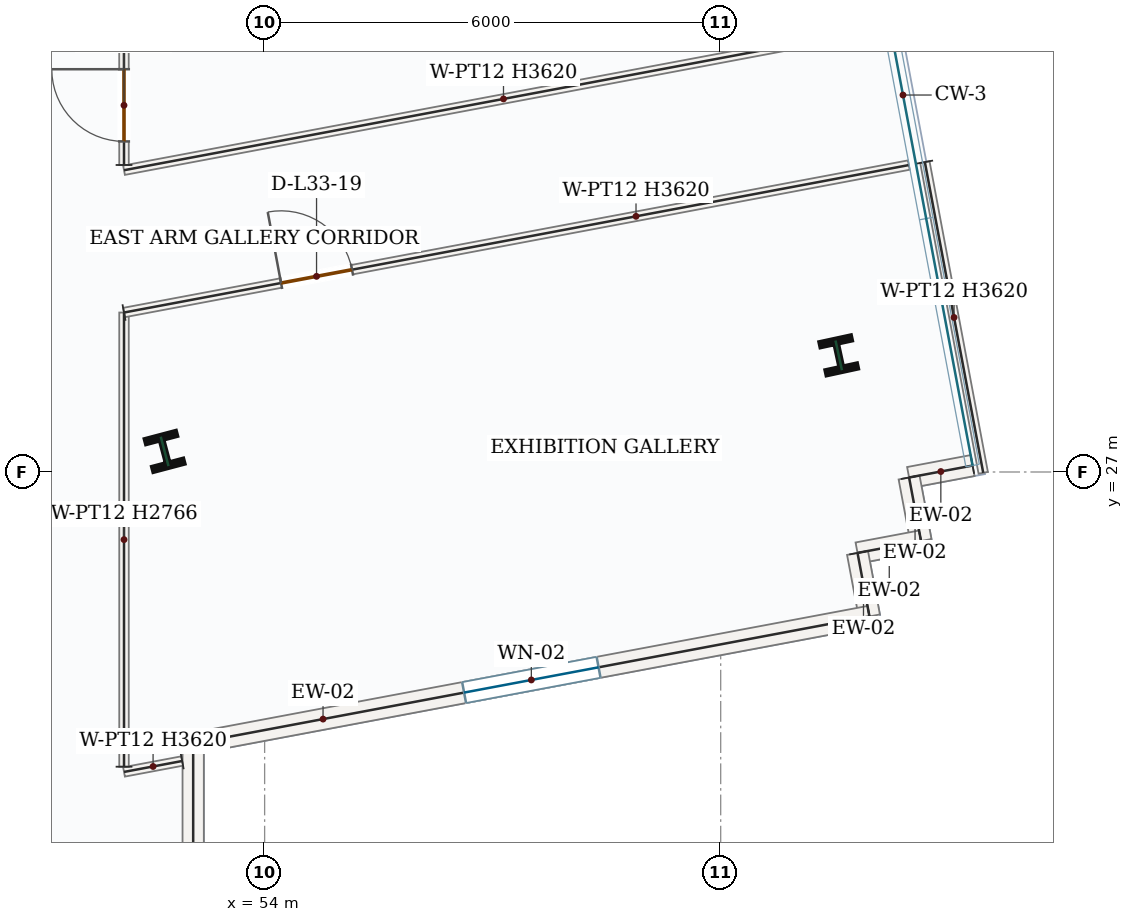
"""IFC4 building model, lengths in metres.
Left out: names, types, materials, properties, quantities, classifications, styles, units other than length and angle.
Written with IfcOpenShell. Run it as: python <this file> out.ifc"""

import sys

from ifc_helpers import new_model, si_unit, direction, frame, frame_2d, origin, origin_2d, place, context, subcontext, project, spatial, rectangle, i_section, extrude, source, transform, mapped, element, fill, save


model = new_model("IFC4")
c1 = context("Model", 3, precision=1e-05, world=origin(), true_north=direction((0.0, 1.0)))
c2 = subcontext(c1, "Body", "Model", "MODEL_VIEW")
j1 = project(units=[si_unit("LENGTHUNIT", "METRE"), si_unit("PLANEANGLEUNIT", "RADIAN")], contexts=[c1])
p1 = place(None, origin())
s1 = spatial("IfcSite", under=j1, at=p1, CompositionType="ELEMENT")
p2 = place(p1, origin())
s2 = spatial("IfcBuilding", under=s1, at=p2, CompositionType="ELEMENT")
p3 = place(p2, frame((0.0, 0.0, 147.3)))
s3 = spatial("IfcBuildingStorey", under=s2, at=p3, CompositionType="ELEMENT", Elevation=147.3)
m1 = source(origin(), c2, "Body", "SweptSolid", [
    extrude(i_section(OverallWidth=0.412, OverallDepth=0.435, WebThickness=0.036, FlangeThickness=0.057, FilletRadius=0.018, at=origin_2d()), origin(), (0.0, 0.0, 1.0), 3.9),
])
for number, where, z_axis, x_axis in (
    (1, (52.684, 27.271, 0.0), (0.0, 0.0, 1.0), (0.967, 0.255, 0.0)),
    (2, (61.553, 28.535, 0.0), (0.0, 0.0, 1.0), (0.977, 0.211, 0.0)),
):
    element("IfcColumn", number, at=place(p3, frame(where, z_axis=z_axis, x_axis=x_axis)), inside=s3, PredefinedType="COLUMN", context=c2, shape_type="MappedRepresentation", body=[
        mapped(m1, transform((0.0, 0.0, 0.0), x_axis=(1.0, 0.0, 0.0), y_axis=(0.0, 1.0, 0.0), z_axis=(0.0, 0.0, 1.0), scale=1.0)),
    ])
m2 = source(origin(), c2, "Body", "SweptSolid", [
    extrude(rectangle(XDim=0.85, YDim=0.28, at=frame_2d((0.425, 0.0))), origin(), (0.0, 0.0, 1.0), 3.62),
])
for number, where, z_axis, x_axis in (
    (3, (63.314, 27.085, 0.0), (0.0, 0.0, 1.0), (-0.983, -0.185, 0.0)),
    (4, (62.479, 26.928, 0.0), (0.0, 0.0, 1.0), (0.185, -0.983, 0.0)),
):
    element("IfcWall", number, at=place(p3, frame(where, z_axis=z_axis, x_axis=x_axis)), inside=s3, PredefinedType="SOLIDWALL", context=c2, shape_type="MappedRepresentation", body=[
        mapped(m2, transform((0.0, 0.0, 0.0), x_axis=(1.0, 0.0, 0.0), y_axis=(0.0, 1.0, 0.0), z_axis=(0.0, 0.0, 1.0), scale=1.0)),
    ])
m3 = source(origin(), c2, "Body", "SweptSolid", [
    extrude(rectangle(XDim=0.85, YDim=0.28, at=frame_2d((0.425, 0.0))), origin(), (0.0, 0.0, 1.0), 3.62),
])
p4 = place(p3, frame((62.635, 26.092, 0.0), z_axis=(0.0, 0.0, 1.0), x_axis=(-0.982790785128, -0.184722149909, 0.0)))
e5 = element("IfcWall", 5, at=p4, inside=s3, PredefinedType="SOLIDWALL", context=c2, shape_type="MappedRepresentation", body=[
    mapped(m3, transform((0.0, 0.0, 0.0), x_axis=(1.0, 0.0, 0.0), y_axis=(0.0, 1.0, 0.0), z_axis=(0.0, 0.0, 1.0), scale=1.0)),
])
p5 = place(p3, frame((61.8, 25.935, 0.0), z_axis=(0.0, 0.0, 1.0), x_axis=(0.184392582027, -0.982852672425, 0.0)))
e6 = element("IfcWall", 6, at=p5, inside=s3, PredefinedType="SOLIDWALL", context=c2, shape_type="MappedRepresentation", body=[
    mapped(m2, transform((0.0, 0.0, 0.0), x_axis=(1.0, 0.0, 0.0), y_axis=(0.0, 1.0, 0.0), z_axis=(0.0, 0.0, 1.0), scale=1.0)),
])
p6 = place(p3, frame((61.957, 25.1, 0.0), z_axis=(0.0, 0.0, 1.0), x_axis=(-0.982808012228, -0.184630471755, 0.0)))
e7 = element("IfcWall", 7, at=p6, inside=s3, PredefinedType="SOLIDWALL", context=c2, shape_type="SweptSolid", body=[
    extrude(rectangle(XDim=9.052, YDim=0.28, at=frame_2d((4.526, 0.0))), origin(), (0.0, 0.0, 1.0), 3.62),
])
p7 = place(p6, frame((3.626, 0.0, 0.85)))
e8 = element("IfcOpeningElement", 8, at=p7, cuts=e7, PredefinedType="OPENING", context=c2, shape_type="SweptSolid", body=[
    extrude(rectangle(XDim=1.8, YDim=1.75, at=frame_2d((0.9, 0.875))), frame((0.0, 0.15, 0.0), z_axis=(0.0, -1.0, 0.0), x_axis=(1.0, 0.0, 0.0)), (0.0, 0.0, 1.0), 0.3),
])
m4 = source(origin(), c2, "Body", "SweptSolid", [
    extrude(rectangle(XDim=4.97, YDim=0.28, at=frame_2d((2.485, 0.0))), origin(), (0.0, 0.0, 1.0), 3.62),
])
p8 = place(p3, frame((53.06, 23.428, 0.0), z_axis=(0.0, 0.0, 1.0), x_axis=(0.0, -1.0, 0.0)))
e9 = element("IfcWall", 9, at=p8, inside=s3, PredefinedType="SOLIDWALL", context=c2, shape_type="MappedRepresentation", body=[
    mapped(m4, transform((0.0, 0.0, 0.0), x_axis=(1.0, 0.0, 0.0), y_axis=(0.0, 1.0, 0.0), z_axis=(0.0, 0.0, 1.0), scale=1.0)),
])
m5 = source(origin(), c2, "Body", "SweptSolid", [
    extrude(rectangle(XDim=4.16, YDim=0.125, at=frame_2d((2.08, 0.0))), origin(), (0.0, 0.0, 1.0), 3.62),
])
p9 = place(p3, frame((62.686, 31.077, 0.0), z_axis=(0.0, 0.0, 1.0), x_axis=(0.184635785614, -0.982807013951, 0.0)))
e10 = element("IfcWall", 10, at=p9, inside=s3, PredefinedType="PARTITIONING", context=c2, shape_type="MappedRepresentation", body=[
    mapped(m5, transform((0.0, 0.0, 0.0), x_axis=(1.0, 0.0, 0.0), y_axis=(0.0, 1.0, 0.0), z_axis=(0.0, 0.0, 1.0), scale=1.0)),
])
m6 = source(origin(), c2, "Body", "SweptSolid", [
    extrude(rectangle(XDim=0.779, YDim=0.125, at=frame_2d((0.389, 0.0))), origin(), (0.0, 0.0, 1.0), 3.62),
])
p10 = place(p3, frame((52.915, 23.198, 0.0), z_axis=(0.0, 0.0, 1.0), x_axis=(-0.982850878619, -0.184402143149, 0.0)))
e11 = element("IfcWall", 11, at=p10, inside=s3, PredefinedType="PARTITIONING", context=c2, shape_type="MappedRepresentation", body=[
    mapped(m6, transform((0.0, 0.0, 0.0), x_axis=(1.0, 0.0, 0.0), y_axis=(0.0, 1.0, 0.0), z_axis=(0.0, 0.0, 1.0), scale=1.0)),
])
m7 = source(origin(), c2, "Body", "SweptSolid", [
    extrude(rectangle(XDim=5.975, YDim=0.125, at=frame_2d((2.988, 0.0))), origin(), (0.0, 0.0, 1.0), 2.766),
])
p11 = place(p3, frame((52.15, 23.123, 0.0), z_axis=(0.0, 0.0, 1.0), x_axis=(0.0, 1.0, 0.0)))
e12 = element("IfcWall", 12, at=p11, inside=s3, PredefinedType="PARTITIONING", context=c2, shape_type="MappedRepresentation", body=[
    mapped(m7, transform((0.0, 0.0, 0.0), x_axis=(1.0, 0.0, 0.0), y_axis=(0.0, 1.0, 0.0), z_axis=(0.0, 0.0, 1.0), scale=1.0)),
])
p12 = place(p3, frame((52.15, 29.098, 0.0), z_axis=(0.0, 0.0, 1.0), x_axis=(0.982805559331, 0.184643528314, 0.0)))
e13 = element("IfcWall", 13, at=p12, inside=s3, PredefinedType="PARTITIONING", context=c2, shape_type="SweptSolid", body=[
    extrude(rectangle(XDim=10.505, YDim=0.125, at=frame_2d((5.252, 0.0))), origin(), (0.0, 0.0, 1.0), 3.62),
])
p13 = place(p12, frame((2.102, 0.0, 0.0)))
e14 = element("IfcOpeningElement", 14, at=p13, cuts=e13, PredefinedType="OPENING", context=c2, shape_type="SweptSolid", body=[
    extrude(rectangle(XDim=0.95, YDim=2.15, at=frame_2d((0.475, 1.075))), frame((0.0, 0.073, 0.0), z_axis=(0.0, -1.0, 0.0), x_axis=(1.0, 0.0, 0.0)), (0.0, 0.0, 1.0), 0.145),
])
m8 = source(origin(), c2, "Body", "SweptSolid", [
    extrude(rectangle(XDim=10.16, YDim=0.125, at=frame_2d((5.08, 0.0))), origin(), (0.0, 0.0, 1.0), 3.62),
])
p14 = place(p3, frame((62.135, 32.846, 0.0), z_axis=(0.0, 0.0, 1.0), x_axis=(-0.982809288671, -0.184623676981, 0.0)))
e15 = element("IfcWall", 15, at=p14, inside=s3, PredefinedType="PARTITIONING", context=c2, shape_type="MappedRepresentation", body=[
    mapped(m8, transform((0.0, 0.0, 0.0), x_axis=(1.0, 0.0, 0.0), y_axis=(0.0, 1.0, 0.0), z_axis=(0.0, 0.0, 1.0), scale=1.0)),
])
p15 = place(p3, frame((52.15, 31.039, 0.0), z_axis=(0.0, 0.0, 1.0), x_axis=(-0.0004137788, 0.999999914394, 0.0)))
e16 = element("IfcWall", 16, at=p15, inside=s3, PredefinedType="PARTITIONING", context=c2, shape_type="SweptSolid", body=[
    extrude(rectangle(XDim=2.36, YDim=0.125, at=frame_2d((1.18, 0.0))), origin(), (0.0, 0.0, 1.0), 3.149),
])
p16 = place(p15, frame((0.31, 0.0, 0.0)))
e17 = element("IfcOpeningElement", 17, at=p16, cuts=e16, PredefinedType="OPENING", context=c2, shape_type="SweptSolid", body=[
    extrude(rectangle(XDim=0.95, YDim=2.15, at=frame_2d((0.475, 1.075))), frame((0.0, 0.073, 0.0), z_axis=(0.0, -1.0, 0.0), x_axis=(1.0, 0.0, 0.0)), (0.0, 0.0, 1.0), 0.145),
])
m9 = source(origin(), c2, "Body", "SweptSolid", [
    extrude(rectangle(XDim=1.8, YDim=1.75, at=frame_2d((0.9, 0.875))), frame((0.0, 0.03, 0.0), z_axis=(0.0, -1.0, 0.0), x_axis=(1.0, 0.0, 0.0)), (0.0, 0.0, 1.0), 0.06),
])
p17 = place(p7, origin())
e18 = element("IfcWindow", 18, at=p17, inside=s3, PartitioningType="DOUBLE_PANEL_VERTICAL", PredefinedType="WINDOW", context=c2, shape_type="MappedRepresentation", body=[
    mapped(m9, transform((0.0, 0.0, 0.0), x_axis=(1.0, 0.0, 0.0), y_axis=(0.0, 1.0, 0.0), z_axis=(0.0, 0.0, 1.0), scale=1.0)),
])
fill(e8, e18)
m10 = source(origin(), c2, "Body", "SweptSolid", [
    extrude(rectangle(XDim=0.95, YDim=2.15, at=frame_2d((0.475, 1.075))), frame((0.0, 0.025, 0.0), z_axis=(0.0, -1.0, 0.0), x_axis=(1.0, 0.0, 0.0)), (0.0, 0.0, 1.0), 0.05),
])
p18 = place(p13, origin())
e19 = element("IfcDoor", 19, at=p18, inside=s3, OperationType="SINGLE_SWING_LEFT", PredefinedType="DOOR", context=c2, shape_type="MappedRepresentation", body=[
    mapped(m10, transform((0.0, 0.0, 0.0), x_axis=(1.0, 0.0, 0.0), y_axis=(0.0, 1.0, 0.0), z_axis=(0.0, 0.0, 1.0), scale=1.0)),
])
fill(e14, e19)
p19 = place(p16, origin())
e20 = element("IfcDoor", 20, at=p19, inside=s3, OperationType="SINGLE_SWING_RIGHT", PredefinedType="DOOR", context=c2, shape_type="MappedRepresentation", body=[
    mapped(m10, transform((0.0, 0.0, 0.0), x_axis=(1.0, 0.0, 0.0), y_axis=(0.0, 1.0, 0.0), z_axis=(0.0, 0.0, 1.0), scale=1.0)),
])
fill(e17, e20)
save(model, sys.argv[1])
